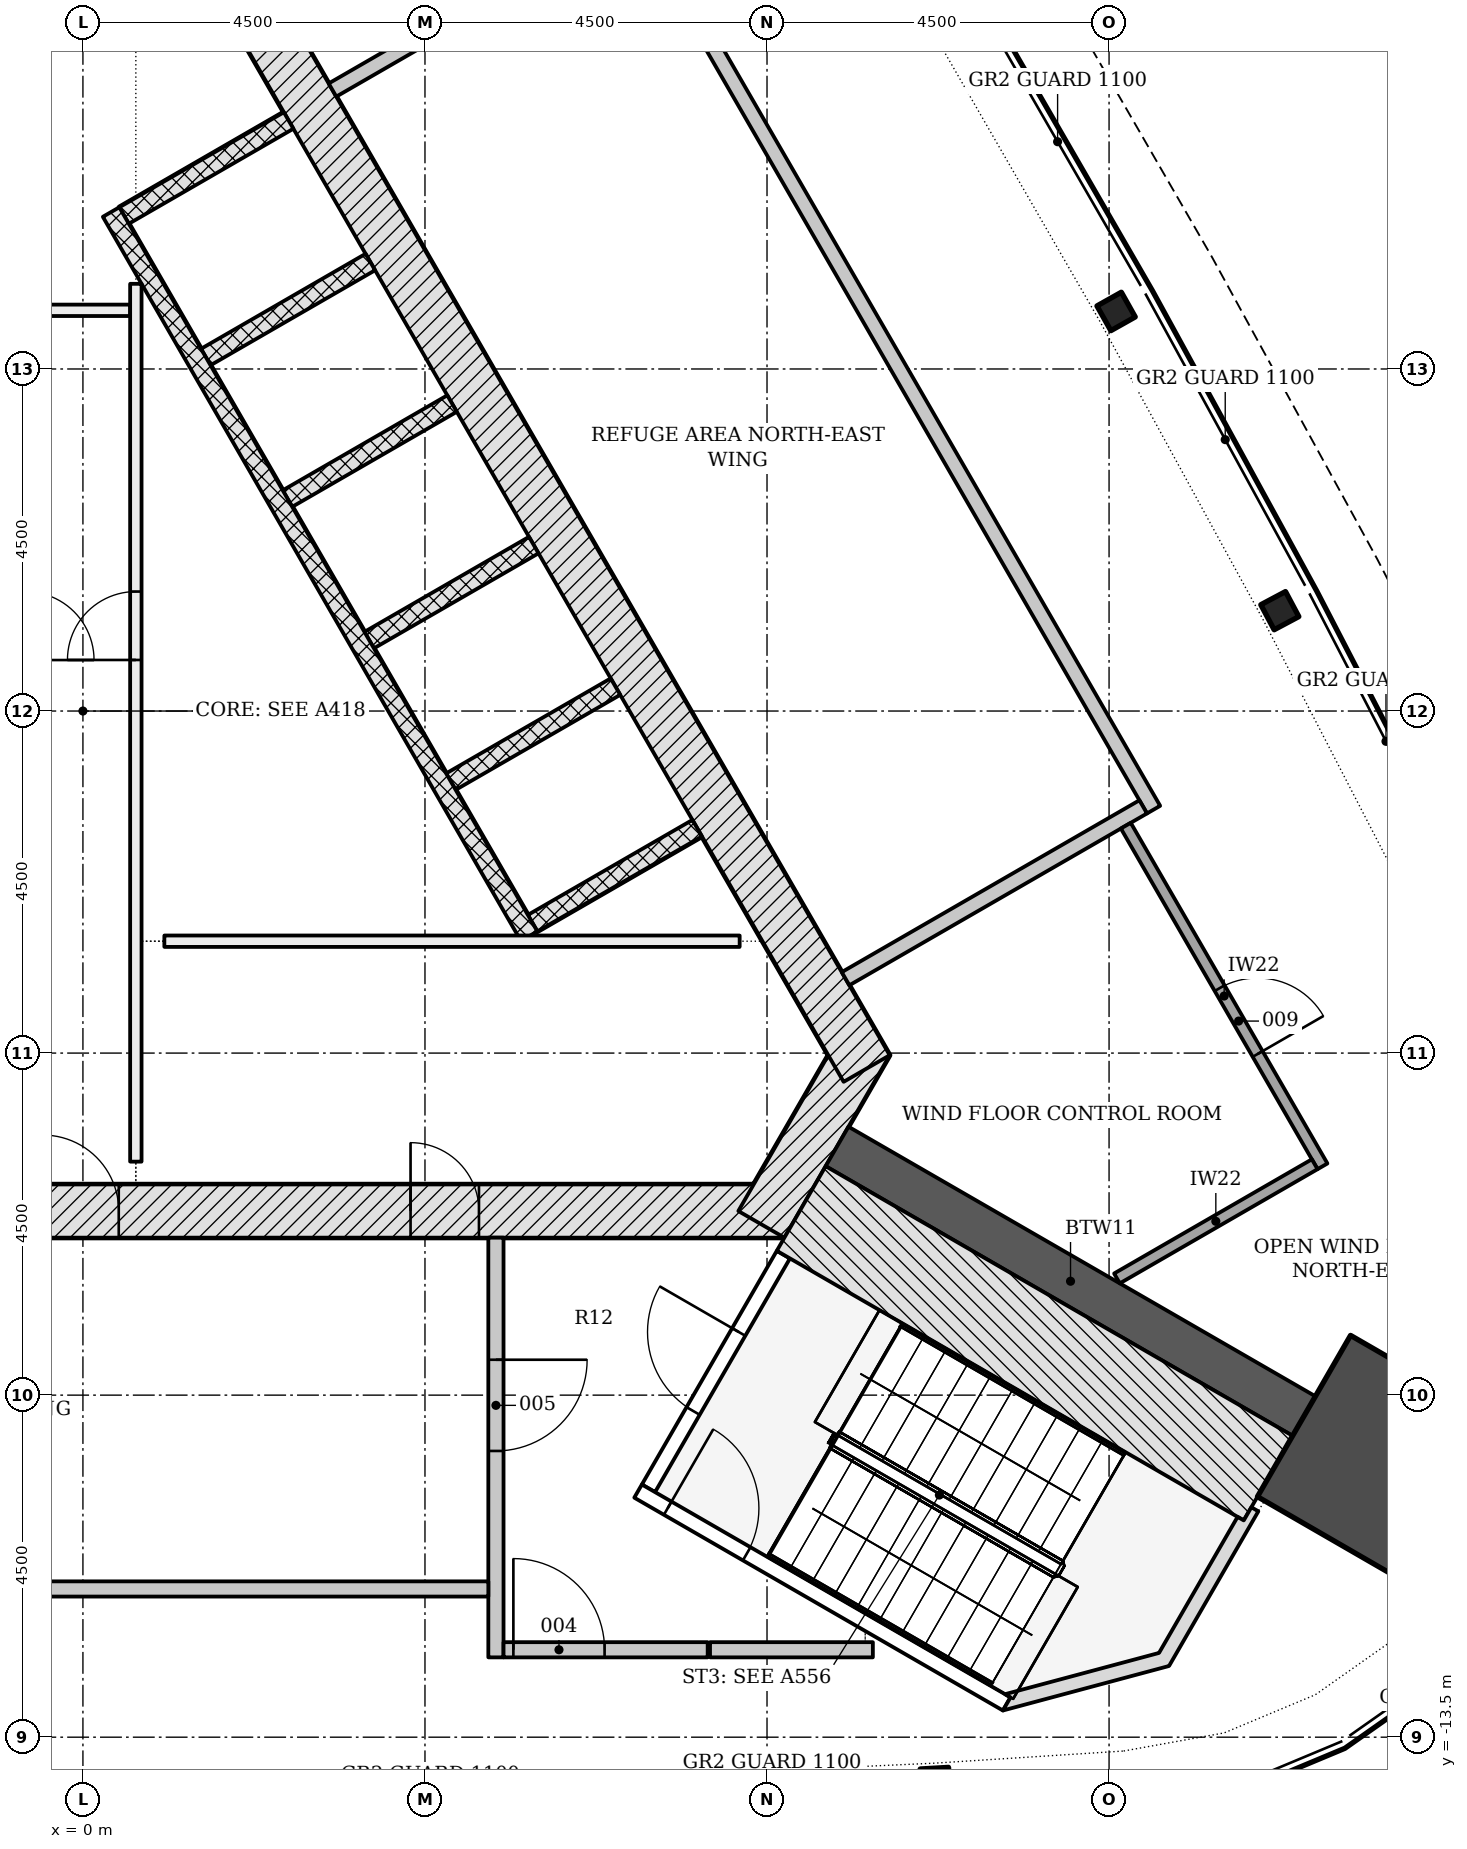
"""IFC4 building model, lengths in metres.
Left out: names, types, materials, properties, quantities, classifications, styles, units other than length and angle.
Written with IfcOpenShell. Run it as: python <this file> out.ifc"""

import sys

from ifc_helpers import new_model, si_unit, direction, frame, frame_2d, origin, origin_2d, place, context, subcontext, project, spatial, polyline, rectangle, i_section, outline, extrude, element, fill, save


model = new_model("IFC4")
c1 = context("Model", 3, precision=1e-05, world=origin(), true_north=direction((0.0, 1.0)))
c2 = subcontext(c1, "Body", "Model", "MODEL_VIEW")
j1 = project(units=[si_unit("LENGTHUNIT", "METRE"), si_unit("PLANEANGLEUNIT", "RADIAN")], contexts=[c1])
p1 = place(None, origin())
s1 = spatial("IfcSite", under=j1, at=p1, CompositionType="ELEMENT")
p2 = place(p1, origin())
s2 = spatial("IfcBuilding", under=s1, at=p2, CompositionType="ELEMENT")
p3 = place(p2, frame((0.0, 0.0, 250.8)))
s3 = spatial("IfcBuildingStorey", under=s2, at=p3, CompositionType="ELEMENT", Elevation=250.8)
p4 = place(p3, frame((-9.229, -6.578, -0.3), z_axis=(0.0, 0.0, 1.0), x_axis=(1.0, 0.0, 0.0)))
e1 = element("IfcWall", 1, at=p4, inside=s3, PredefinedType="SHEAR", context=c2, shape_type="SweptSolid", body=[
    extrude(rectangle(XDim=18.458, YDim=0.7, at=frame_2d((9.229, 0.0))), origin(), (0.0, 0.0, 1.0), 7.2),
])
p5 = place(p4, frame((8.7, 0.0, 0.3)))
e2 = element("IfcOpeningElement", 2, at=p5, cuts=e1, PredefinedType="OPENING", context=c2, shape_type="SweptSolid", body=[
    extrude(rectangle(XDim=1.0, YDim=2.1, at=frame_2d((0.5, 1.05))), frame((0.0, 0.36, 0.0), z_axis=(0.0, -1.0, 0.0), x_axis=(1.0, 0.0, 0.0)), (0.0, 0.0, 1.0), 0.72),
])
p6 = place(p4, frame((3.99, 0.0, 0.3)))
e3 = element("IfcOpeningElement", 3, at=p6, cuts=e1, PredefinedType="OPENING", context=c2, shape_type="SweptSolid", body=[
    extrude(rectangle(XDim=0.9, YDim=2.1, at=frame_2d((0.45, 1.05))), frame((0.0, 0.36, 0.0), z_axis=(0.0, -1.0, 0.0), x_axis=(1.0, 0.0, 0.0)), (0.0, 0.0, 1.0), 0.72),
])
p7 = place(p4, frame((13.539, 0.0, 0.3)))
e4 = element("IfcOpeningElement", 4, at=p7, cuts=e1, PredefinedType="OPENING", context=c2, shape_type="SweptSolid", body=[
    extrude(rectangle(XDim=0.9, YDim=2.1, at=frame_2d((0.45, 1.05))), frame((0.0, 0.36, 0.0), z_axis=(0.0, -1.0, 0.0), x_axis=(1.0, 0.0, 0.0)), (0.0, 0.0, 1.0), 0.72),
])
p8 = place(p3, frame((8.926, -6.753, -0.3), z_axis=(0.0, 0.0, 1.0), x_axis=(0.500042739161, 0.866000726912, 0.0)))
e5 = element("IfcWall", 5, at=p8, inside=s3, PredefinedType="SHEAR", context=c2, shape_type="SweptSolid", body=[
    extrude(rectangle(XDim=2.771, YDim=0.7, at=frame_2d((1.386, 0.0))), origin(), (0.0, 0.0, 1.0), 7.2),
])
p9 = place(p3, frame((10.311, -4.703, -0.3), z_axis=(0.0, 0.0, 1.0), x_axis=(-0.500001446645, 0.866024568562, 0.0)))
e6 = element("IfcWall", 6, at=p9, inside=s3, PredefinedType="SHEAR", context=c2, shape_type="SweptSolid", body=[
    extrude(rectangle(XDim=18.458, YDim=0.7, at=frame_2d((9.229, 0.0))), origin(), (0.0, 0.0, 1.0), 7.2),
])
p10 = place(p3, frame((9.922, -5.728, -0.3), z_axis=(0.0, 0.0, 1.0), x_axis=(0.866029688112, -0.499992579254, 0.0)))
e7 = element("IfcWall", 7, at=p10, inside=s3, PredefinedType="SHEAR", context=c2, shape_type="SweptSolid", body=[
    extrude(rectangle(XDim=7.093, YDim=0.6, at=frame_2d((3.547, 0.0))), origin(), (0.0, 0.0, 1.0), 7.2),
])
p11 = place(p3, frame((17.126, -9.887, -0.3), z_axis=(0.0, 0.0, 1.0), x_axis=(0.866025403784, -0.5, 0.0)))
e8 = element("IfcColumn", 8, at=p11, inside=s3, PredefinedType="COLUMN", context=c2, shape_type="SweptSolid", body=[
    extrude(rectangle(XDim=2.45, YDim=2.45, at=origin_2d()), origin(), (0.0, 0.0, 1.0), 7.2),
])
for number, where, z_axis, x_axis in (
    (9, (11.212, -14.092, -0.3), (0.0, 0.0, 1.0), (0.998, 0.057, 0.0)),
    (10, (15.747, 1.32, -0.3), (0.0, 0.0, 1.0), (-0.47, 0.883, 0.0)),
    (11, (13.593, 5.257, -0.3), (0.0, 0.0, 1.0), (-0.49, 0.872, 0.0)),
):
    element("IfcColumn", number, at=place(p3, frame(where, z_axis=z_axis, x_axis=x_axis)), inside=s3, PredefinedType="COLUMN", context=c2, shape_type="SweptSolid", body=[
        extrude(i_section(OverallWidth=0.373, OverallDepth=0.368, WebThickness=0.015, FlangeThickness=0.024, FilletRadius=0.015, at=origin_2d()), origin(), (0.0, 0.0, 1.0), 7.2),
    ])
for number, where, z_axis, x_axis in (
    (12, (8.081, -1.541, -0.3), (0.0, 0.0, 1.0), (-0.866, -0.5, 0.0)),
    (13, (7.006, 0.321, -0.3), (0.0, 0.0, 1.0), (-0.866, -0.5, 0.0)),
):
    element("IfcWall", number, at=place(p3, frame(where, z_axis=z_axis, x_axis=x_axis)), inside=s3, PredefinedType="PARTITIONING", context=c2, shape_type="SweptSolid", body=[
        extrude(rectangle(XDim=2.5, YDim=0.25, at=frame_2d((1.25, 0.0))), origin(), (0.0, 0.0, 1.0), 7.2),
    ])
p12 = place(p3, frame((5.931, 2.183, -0.3), z_axis=(0.0, 0.0, 1.0), x_axis=(-0.866047370643, -0.499961950354, 0.0)))
e14 = element("IfcWall", 14, at=p12, inside=s3, PredefinedType="PARTITIONING", context=c2, shape_type="SweptSolid", body=[
    extrude(rectangle(XDim=2.5, YDim=0.25, at=frame_2d((1.25, 0.0))), origin(), (0.0, 0.0, 1.0), 7.2),
])
for number, where, z_axis, x_axis in (
    (15, (4.856, 4.045, -0.3), (0.0, 0.0, 1.0), (-0.866, -0.5, 0.0)),
    (16, (3.781, 5.907, -0.3), (0.0, 0.0, 1.0), (-0.866, -0.5, 0.0)),
    (17, (2.706, 7.769, -0.3), (0.0, 0.0, 1.0), (-0.866, -0.5, 0.0)),
):
    element("IfcWall", number, at=place(p3, frame(where, z_axis=z_axis, x_axis=x_axis)), inside=s3, PredefinedType="PARTITIONING", context=c2, shape_type="SweptSolid", body=[
        extrude(rectangle(XDim=2.5, YDim=0.25, at=frame_2d((1.25, 0.0))), origin(), (0.0, 0.0, 1.0), 7.2),
    ])
p13 = place(p3, frame((5.87, -2.961, 0.0), z_axis=(0.0, 0.0, 1.0), x_axis=(-0.50000615651, 0.866021849293, 0.0)))
e18 = element("IfcWall", 18, at=p13, inside=s3, PredefinedType="PARTITIONING", context=c2, shape_type="SweptSolid", body=[
    extrude(rectangle(XDim=11.0, YDim=0.25, at=frame_2d((5.5, 0.0))), origin(), (0.0, 0.0, 1.0), 6.9),
])
p14 = place(p3, frame((-0.679, 5.272, 0.0), z_axis=(0.0, 0.0, 1.0), x_axis=(1.0, 0.0, 0.0)))
e19 = element("IfcWall", 19, at=p14, inside=s3, PredefinedType="PARTITIONING", context=c2, shape_type="SweptSolid", body=[
    extrude(rectangle(XDim=1.3, YDim=0.15, at=frame_2d((0.65, 0.0))), origin(), (0.0, 0.0, 1.0), 6.9),
])
p15 = place(p3, frame((0.696, -5.928, 0.0), z_axis=(0.0, 0.0, 1.0), x_axis=(0.0, 1.0, 0.0)))
e20 = element("IfcWall", 20, at=p15, inside=s3, PredefinedType="PARTITIONING", context=c2, shape_type="SweptSolid", body=[
    extrude(rectangle(XDim=11.549, YDim=0.15, at=frame_2d((5.774, 0.0))), origin(), (0.0, 0.0, 1.0), 6.9),
])
p16 = place(p15, frame((6.6, 0.0, 0.0)))
e21 = element("IfcOpeningElement", 21, at=p16, cuts=e20, PredefinedType="OPENING", context=c2, shape_type="SweptSolid", body=[
    extrude(rectangle(XDim=0.9, YDim=2.1, at=frame_2d((0.45, 1.05))), frame((0.0, 0.085, 0.0), z_axis=(0.0, -1.0, 0.0), x_axis=(1.0, 0.0, 0.0)), (0.0, 0.0, 1.0), 0.17),
])
p17 = place(p3, frame((1.071, -3.028, 0.0), z_axis=(0.0, 0.0, 1.0), x_axis=(1.0, 0.0, 0.0)))
e22 = element("IfcWall", 22, at=p17, inside=s3, PredefinedType="PARTITIONING", context=c2, shape_type="SweptSolid", body=[
    extrude(rectangle(XDim=7.569, YDim=0.15, at=frame_2d((3.784, 0.0))), origin(), (0.0, 0.0, 1.0), 6.9),
])
p18 = place(p3, frame((7.44, -10.226, -0.3), z_axis=(0.0, 0.0, 1.0), x_axis=(0.500022077904, 0.866012656725, 0.0)))
e23 = element("IfcWall", 23, at=p18, inside=s3, PredefinedType="SHEAR", context=c2, shape_type="SweptSolid", body=[
    extrude(rectangle(XDim=3.55, YDim=0.2, at=frame_2d((1.775, 0.0))), origin(), (0.0, 0.0, 1.0), 7.2),
])
p19 = place(p18, frame((1.175, 0.0, 0.3)))
e24 = element("IfcOpeningElement", 24, at=p19, cuts=e23, PredefinedType="OPENING", context=c2, shape_type="SweptSolid", body=[
    extrude(rectangle(XDim=1.2, YDim=2.1, at=frame_2d((0.6, 1.05))), frame((0.0, 0.11, 0.0), z_axis=(0.0, -1.0, 0.0), x_axis=(1.0, 0.0, 0.0)), (0.0, 0.0, 1.0), 0.22),
])
p20 = place(p3, frame((7.304, -10.262, -0.3), z_axis=(0.0, 0.0, 1.0), x_axis=(0.866026594901, -0.49999793692, 0.0)))
e25 = element("IfcWall", 25, at=p20, inside=s3, PredefinedType="SHEAR", context=c2, shape_type="SweptSolid", body=[
    extrude(rectangle(XDim=5.6, YDim=0.2, at=frame_2d((2.8, 0.0))), origin(), (0.0, 0.0, 1.0), 7.2),
])
p21 = place(p20, frame((0.45, 0.0, 0.3)))
e26 = element("IfcOpeningElement", 26, at=p21, cuts=e25, PredefinedType="OPENING", context=c2, shape_type="SweptSolid", body=[
    extrude(rectangle(XDim=1.2, YDim=2.1, at=frame_2d((0.6, 1.05))), frame((0.0, 0.11, 0.0), z_axis=(0.0, -1.0, 0.0), x_axis=(1.0, 0.0, 0.0)), (0.0, 0.0, 1.0), 0.22),
])
p22 = place(p3, frame((9.45, -6.545, -0.3), z_axis=(0.0, 0.0, 1.0), x_axis=(0.866023389271, -0.500003489223, 0.0)))
e27 = element("IfcWall", 27, at=p22, inside=s3, PredefinedType="SHEAR", context=c2, shape_type="SweptSolid", body=[
    extrude(rectangle(XDim=7.094, YDim=1.286, at=frame_2d((3.547, 0.0))), origin(), (0.0, 0.0, 1.0), 7.2),
])
p23 = place(p3, frame((0.0, 0.0, -0.3)))
e28 = element("IfcWall", 28, at=p23, inside=s3, PredefinedType="SHEAR", context=c2, shape_type="SweptSolid", body=[
    extrude(outline(polyline([(12.104, -13.149), (14.289, -12.563), (15.464, -10.528), (15.372, -10.475), (15.272, -10.648), (15.272, -10.648), (15.272, -10.648), (15.272, -10.648), (15.272, -10.648), (15.272, -10.648), (15.272, -10.648), (15.272, -10.648), (15.272, -10.648), (15.272, -10.648), (15.272, -10.648), (15.272, -10.648), (15.272, -10.648), (15.272, -10.648), (15.272, -10.648), (15.272, -10.648), (15.272, -10.648), (15.191, -10.601), (14.157, -12.392), (12.132, -12.934), (12.204, -12.976), (12.204, -12.976), (12.204, -12.976), (12.204, -12.976), (12.204, -12.976), (12.204, -12.976), (12.204, -12.976), (12.204, -12.976), (12.204, -12.976), (12.204, -12.976), (12.204, -12.976), (12.204, -12.976), (12.204, -12.976), (12.204, -12.976), (12.204, -12.976), (12.204, -12.976), (12.204, -12.976), (12.104, -13.149)])), origin(), (0.0, 0.0, 1.0), 7.2),
])
p24 = place(p3, frame((5.434, -6.928, 0.0), z_axis=(0.0, 0.0, 1.0), x_axis=(0.0, -1.0, 0.0)))
e29 = element("IfcWall", 29, at=p24, inside=s3, PredefinedType="PARTITIONING", context=c2, shape_type="SweptSolid", body=[
    extrude(rectangle(XDim=5.522, YDim=0.2, at=frame_2d((2.761, 0.0))), origin(), (0.0, 0.0, 1.0), 6.9),
])
p25 = place(p24, frame((1.606, 0.0, 0.0)))
e30 = element("IfcOpeningElement", 30, at=p25, cuts=e29, PredefinedType="OPENING", context=c2, shape_type="SweptSolid", body=[
    extrude(rectangle(XDim=1.2, YDim=2.1, at=frame_2d((0.6, 1.05))), frame((0.0, 0.11, 0.0), z_axis=(0.0, -1.0, 0.0), x_axis=(1.0, 0.0, 0.0)), (0.0, 0.0, 1.0), 0.22),
])
p26 = place(p3, frame((-9.667, -11.55, 0.0), z_axis=(0.0, 0.0, 1.0), x_axis=(1.0, 0.0, 0.0)))
e31 = element("IfcWall", 31, at=p26, inside=s3, PredefinedType="PARTITIONING", context=c2, shape_type="SweptSolid", body=[
    extrude(rectangle(XDim=15.0, YDim=0.2, at=frame_2d((7.5, 0.0))), origin(), (0.0, 0.0, 1.0), 6.352),
])
p27 = place(p3, frame((5.534, -12.35, 0.0), z_axis=(0.0, 0.0, 1.0), x_axis=(1.0, 0.0, 0.0)))
e32 = element("IfcWall", 32, at=p27, inside=s3, PredefinedType="PARTITIONING", context=c2, shape_type="SweptSolid", body=[
    extrude(rectangle(XDim=2.686, YDim=0.2, at=frame_2d((1.343, 0.0))), origin(), (0.0, 0.0, 1.0), 6.352),
])
p28 = place(p27, frame((0.129, 0.0, 0.0)))
e33 = element("IfcOpeningElement", 33, at=p28, cuts=e32, PredefinedType="OPENING", context=c2, shape_type="SweptSolid", body=[
    extrude(rectangle(XDim=1.2, YDim=2.1, at=frame_2d((0.6, 1.05))), frame((0.0, 0.11, 0.0), z_axis=(0.0, -1.0, 0.0), x_axis=(1.0, 0.0, 0.0)), (0.0, 0.0, 1.0), 0.22),
])
p29 = place(p3, frame((8.25, -12.35, 0.0), z_axis=(0.0, 0.0, 1.0), x_axis=(1.0, 0.0, 0.0)))
e34 = element("IfcWall", 34, at=p29, inside=s3, PredefinedType="PARTITIONING", context=c2, shape_type="SweptSolid", body=[
    extrude(rectangle(XDim=2.143, YDim=0.2, at=frame_2d((1.071, 0.0))), origin(), (0.0, 0.0, 1.0), 6.9),
])
p30 = place(p3, frame((3.283, 8.17, 0.0), z_axis=(0.0, 0.0, 1.0), x_axis=(0.866036119804, 0.49998143885, 0.0)))
e35 = element("IfcWall", 35, at=p30, inside=s3, PredefinedType="PARTITIONING", context=c2, shape_type="SweptSolid", body=[
    extrude(rectangle(XDim=5.522, YDim=0.2, at=frame_2d((2.761, 0.0))), origin(), (0.0, 0.0, 1.0), 6.9),
])
p31 = place(p30, frame((1.606, 0.0, 0.0)))
e36 = element("IfcOpeningElement", 36, at=p31, cuts=e35, PredefinedType="OPENING", context=c2, shape_type="SweptSolid", body=[
    extrude(rectangle(XDim=1.2, YDim=2.1, at=frame_2d((0.6, 1.05))), frame((0.0, 0.11, 0.0), z_axis=(0.0, -1.0, 0.0), x_axis=(1.0, 0.0, 0.0)), (0.0, 0.0, 1.0), 0.22),
])
p32 = place(p3, frame((7.336, 10.394, 0.0), z_axis=(0.0, 0.0, 1.0), x_axis=(0.499997969693, -0.866026575979, 0.0)))
e37 = element("IfcWall", 37, at=p32, inside=s3, PredefinedType="PARTITIONING", context=c2, shape_type="SweptSolid", body=[
    extrude(rectangle(XDim=13.5, YDim=0.2, at=frame_2d((6.75, 0.0))), origin(), (0.0, 0.0, 1.0), 6.352),
])
p33 = place(p3, frame((10.033, -3.521, 0.0), z_axis=(0.0, 0.0, 1.0), x_axis=(0.866041729639, 0.499971721724, 0.0)))
e38 = element("IfcWall", 38, at=p33, inside=s3, PredefinedType="PARTITIONING", context=c2, shape_type="SweptSolid", body=[
    extrude(rectangle(XDim=4.522, YDim=0.2, at=frame_2d((2.261, 0.0))), origin(), (0.0, 0.0, 1.0), 6.9),
])
p34 = place(p3, frame((13.72, -1.508, 0.0), z_axis=(0.0, 0.0, 1.0), x_axis=(0.500020560727, -0.866013532718, 0.0)))
e39 = element("IfcWall", 39, at=p34, inside=s3, PredefinedType="PARTITIONING", context=c2, shape_type="SweptSolid", body=[
    extrude(rectangle(XDim=5.175, YDim=0.15, at=frame_2d((2.587, 0.0))), origin(), (0.0, 0.0, 1.0), 6.352),
])
p35 = place(p34, frame((2.469, 0.0, 0.0)))
e40 = element("IfcOpeningElement", 40, at=p35, cuts=e39, PredefinedType="OPENING", context=c2, shape_type="SweptSolid", body=[
    extrude(rectangle(XDim=1.0, YDim=2.1, at=frame_2d((0.5, 1.05))), frame((0.0, 0.085, 0.0), z_axis=(0.0, -1.0, 0.0), x_axis=(1.0, 0.0, 0.0)), (0.0, 0.0, 1.0), 0.17),
])
p36 = place(p3, frame((13.604, -7.465, 0.0), z_axis=(0.0, 0.0, 1.0), x_axis=(0.865998815133, 0.500046050067, 0.0)))
e41 = element("IfcWall", 41, at=p36, inside=s3, PredefinedType="PARTITIONING", context=c2, shape_type="SweptSolid", body=[
    extrude(rectangle(XDim=3.004, YDim=0.15, at=frame_2d((1.502, 0.0))), origin(), (0.0, 0.0, 1.0), 6.9),
])
p37 = place(p5, origin())
e42 = element("IfcDoor", 42, at=p37, inside=s3, OperationType="SINGLE_SWING_LEFT", PredefinedType="DOOR", context=c2, shape_type="SweptSolid", body=[
    extrude(rectangle(XDim=1.0, YDim=2.1, at=frame_2d((0.5, 1.05))), frame((0.0, 0.075, 0.0), z_axis=(0.0, -1.0, 0.0), x_axis=(1.0, 0.0, 0.0)), (0.0, 0.0, 1.0), 0.15),
])
fill(e2, e42)
p38 = place(p7, origin())
e43 = element("IfcDoor", 43, at=p38, inside=s3, OperationType="SINGLE_SWING_LEFT", PredefinedType="DOOR", context=c2, shape_type="SweptSolid", body=[
    extrude(rectangle(XDim=0.9, YDim=2.1, at=frame_2d((0.45, 1.05))), frame((0.0, 0.075, 0.0), z_axis=(0.0, -1.0, 0.0), x_axis=(1.0, 0.0, 0.0)), (0.0, 0.0, 1.0), 0.15),
])
fill(e4, e43)
p39 = place(p16, origin())
e44 = element("IfcDoor", 44, at=p39, inside=s3, OperationType="SINGLE_SWING_LEFT", PredefinedType="DOOR", context=c2, shape_type="SweptSolid", body=[
    extrude(rectangle(XDim=0.9, YDim=2.1, at=frame_2d((0.45, 1.05))), frame((0.0, 0.025, 0.0), z_axis=(0.0, -1.0, 0.0), x_axis=(1.0, 0.0, 0.0)), (0.0, 0.0, 1.0), 0.05),
])
fill(e21, e44)
p40 = place(p19, origin())
e45 = element("IfcDoor", 45, at=p40, inside=s3, OperationType="SINGLE_SWING_RIGHT", PredefinedType="DOOR", context=c2, shape_type="SweptSolid", body=[
    extrude(rectangle(XDim=1.2, YDim=2.1, at=frame_2d((0.6, 1.05))), frame((0.0, 0.025, 0.0), z_axis=(0.0, -1.0, 0.0), x_axis=(1.0, 0.0, 0.0)), (0.0, 0.0, 1.0), 0.05),
])
fill(e24, e45)
p41 = place(p21, origin())
e46 = element("IfcDoor", 46, at=p41, inside=s3, OperationType="SINGLE_SWING_LEFT", PredefinedType="DOOR", context=c2, shape_type="SweptSolid", body=[
    extrude(rectangle(XDim=1.2, YDim=2.1, at=frame_2d((0.6, 1.05))), frame((0.0, 0.025, 0.0), z_axis=(0.0, -1.0, 0.0), x_axis=(1.0, 0.0, 0.0)), (0.0, 0.0, 1.0), 0.05),
])
fill(e26, e46)
p42 = place(p28, origin())
e47 = element("IfcDoor", 47, at=p42, inside=s3, OperationType="SINGLE_SWING_LEFT", PredefinedType="DOOR", context=c2, shape_type="SweptSolid", body=[
    extrude(rectangle(XDim=1.2, YDim=2.1, at=frame_2d((0.6, 1.05))), frame((0.0, 0.025, 0.0), z_axis=(0.0, -1.0, 0.0), x_axis=(1.0, 0.0, 0.0)), (0.0, 0.0, 1.0), 0.05),
])
fill(e33, e47)
p43 = place(p25, origin())
e48 = element("IfcDoor", 48, at=p43, inside=s3, OperationType="SINGLE_SWING_LEFT", PredefinedType="DOOR", context=c2, shape_type="SweptSolid", body=[
    extrude(rectangle(XDim=1.2, YDim=2.1, at=frame_2d((0.6, 1.05))), frame((0.0, 0.025, 0.0), z_axis=(0.0, -1.0, 0.0), x_axis=(1.0, 0.0, 0.0)), (0.0, 0.0, 1.0), 0.05),
])
fill(e30, e48)
p44 = place(p35, origin())
e49 = element("IfcDoor", 49, at=p44, inside=s3, OperationType="SINGLE_SWING_RIGHT", PredefinedType="DOOR", context=c2, shape_type="SweptSolid", body=[
    extrude(rectangle(XDim=1.0, YDim=2.1, at=frame_2d((0.5, 1.05))), frame((0.0, 0.025, 0.0), z_axis=(0.0, -1.0, 0.0), x_axis=(1.0, 0.0, 0.0)), (0.0, 0.0, 1.0), 0.05),
])
fill(e40, e49)
save(model, sys.argv[1])
